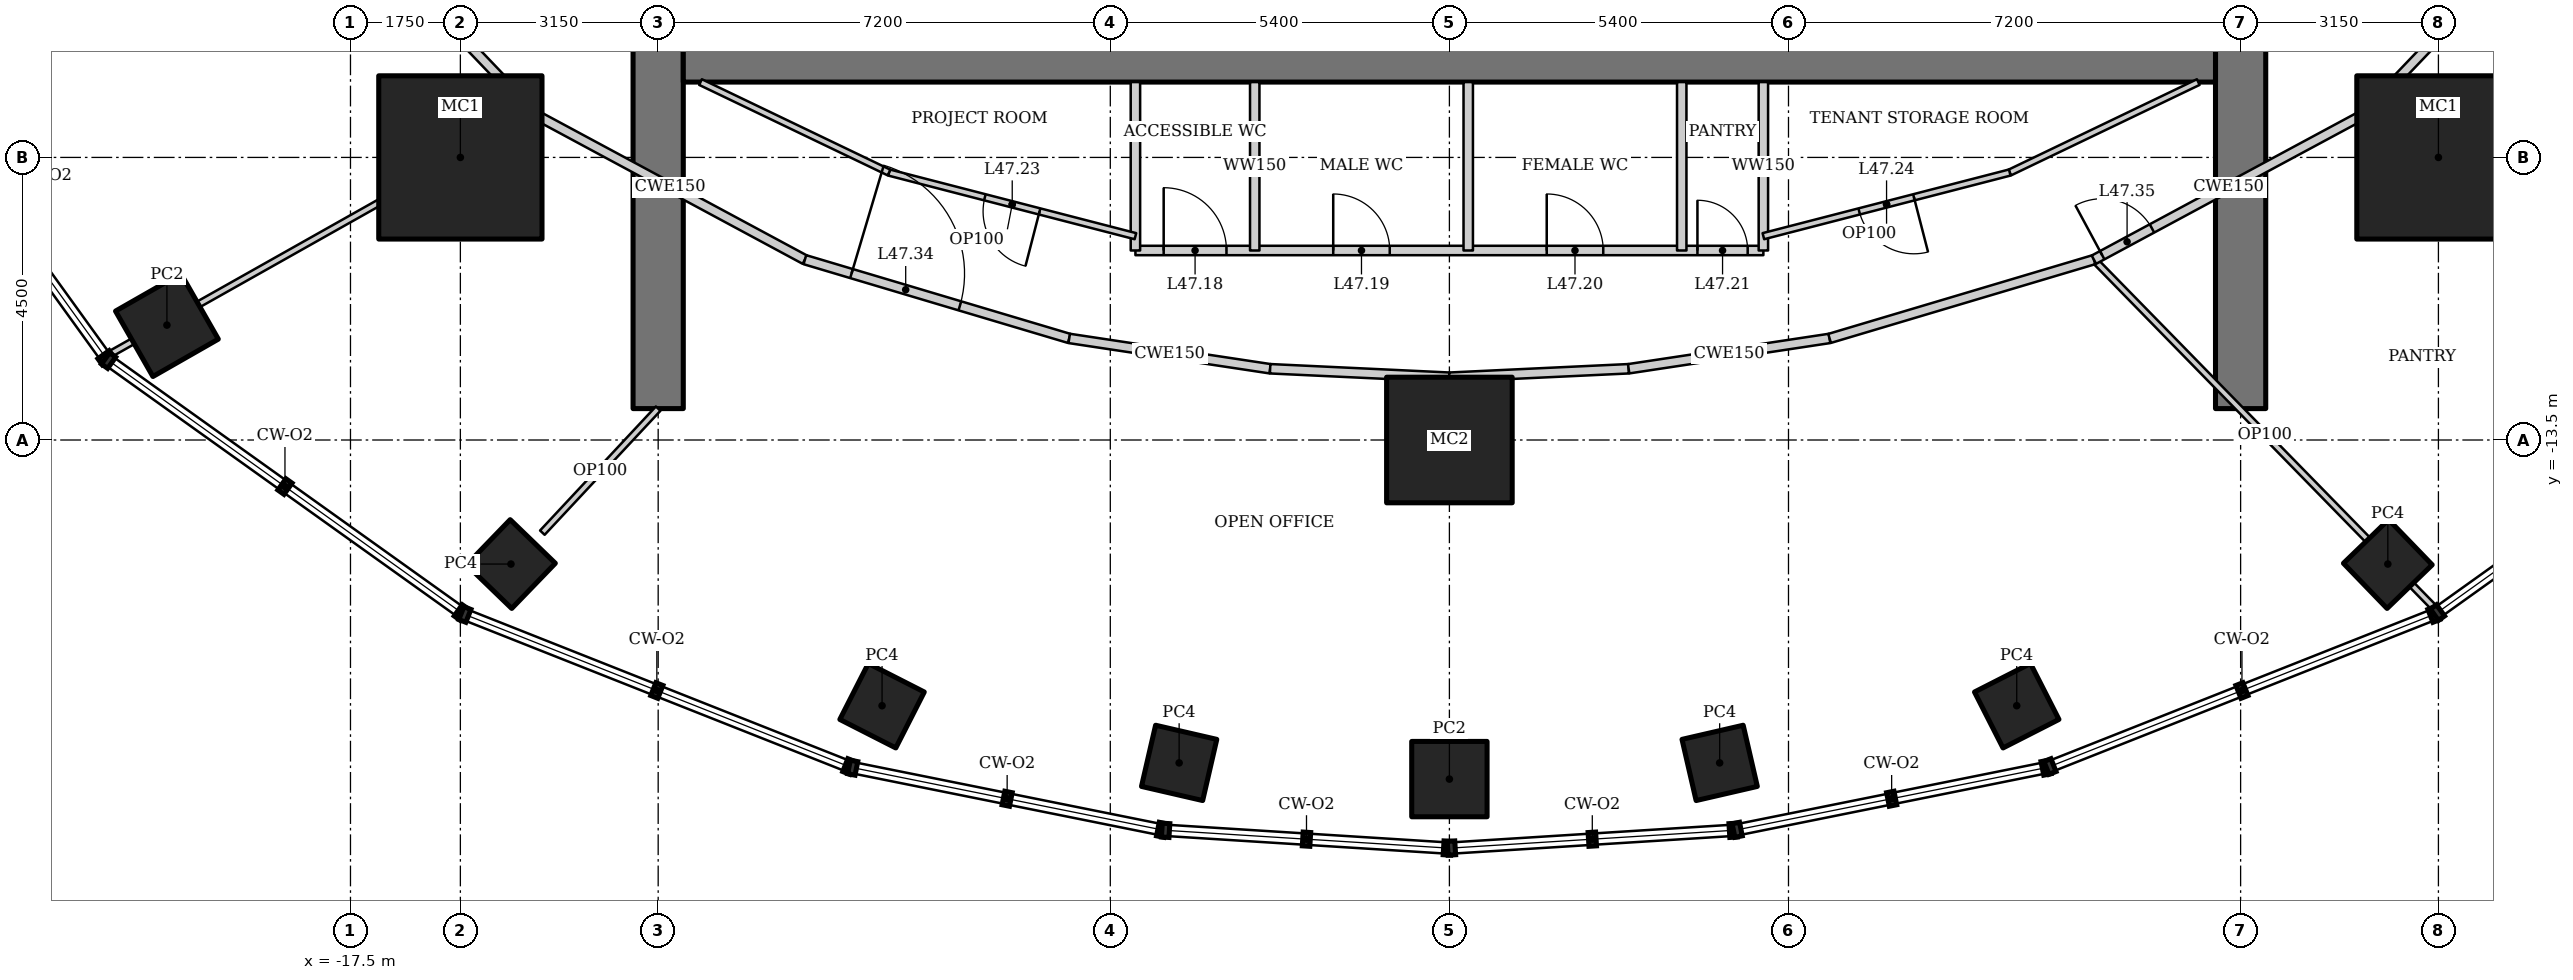
"""IFC4 building model, lengths in metres.
Left out: names, types, materials, properties, quantities, classifications, styles, units other than length and angle.
Written with IfcOpenShell. Run it as: python <this file> out.ifc"""

import sys

from ifc_helpers import new_model, si_unit, direction, frame, frame_2d, origin, origin_2d, place, context, subcontext, project, spatial, rectangle, hollow_rectangle, extrude, element, fill, save


model = new_model("IFC4")
c1 = context("Model", 3, precision=1e-05, world=origin(), true_north=direction((0.0, 1.0)))
c2 = subcontext(c1, "Body", "Model", "MODEL_VIEW")
j1 = project(units=[si_unit("LENGTHUNIT", "METRE"), si_unit("PLANEANGLEUNIT", "RADIAN")], contexts=[c1])
p1 = place(None, origin())
s1 = spatial("IfcSite", under=j1, at=p1, CompositionType="ELEMENT")
p2 = place(p1, origin())
s2 = spatial("IfcBuilding", under=s1, at=p2, CompositionType="ELEMENT")
p3 = place(p2, frame((0.0, 0.0, 203.2)))
s3 = spatial("IfcBuildingStorey", under=s2, at=p3, CompositionType="ELEMENT", Elevation=203.2)
p4 = place(p3, frame((-15.75, -9.0, 0.0), z_axis=(0.0, 0.0, 1.0), x_axis=(1.0, 0.0, 0.0)))
e1 = element("IfcColumn", 1, at=p4, inside=s3, PredefinedType="COLUMN", context=c2, shape_type="SweptSolid", body=[
    extrude(hollow_rectangle(XDim=2.6, YDim=2.6, WallThickness=0.13, at=origin_2d()), origin(), (0.0, 0.0, 1.0), 4.2),
])
p5 = place(p3, frame((0.0, -13.5, 0.0), z_axis=(0.0, 0.0, 1.0), x_axis=(1.0, 0.0, 0.0)))
e2 = element("IfcColumn", 2, at=p5, inside=s3, PredefinedType="COLUMN", context=c2, shape_type="SweptSolid", body=[
    extrude(hollow_rectangle(XDim=2.0, YDim=2.0, WallThickness=0.17, at=origin_2d()), origin(), (0.0, 0.0, 1.0), 4.2),
])
p6 = place(p3, frame((15.75, -9.0, 0.0), z_axis=(0.0, 0.0, 1.0), x_axis=(1.0, 0.0, 0.0)))
e3 = element("IfcColumn", 3, at=p6, inside=s3, PredefinedType="COLUMN", context=c2, shape_type="SweptSolid", body=[
    extrude(hollow_rectangle(XDim=2.6, YDim=2.6, WallThickness=0.13, at=origin_2d()), origin(), (0.0, 0.0, 1.0), 4.2),
])
p7 = place(p3, frame((-20.423, -11.67, 0.0), z_axis=(0.0, 0.0, 1.0), x_axis=(0.86824298017, 0.496139221777, 0.0)))
e4 = element("IfcColumn", 4, at=p7, inside=s3, PredefinedType="COLUMN", context=c2, shape_type="SweptSolid", body=[
    extrude(hollow_rectangle(XDim=1.2, YDim=1.2, WallThickness=0.1, at=origin_2d()), origin(), (0.0, 0.0, 1.0), 4.2),
])
for number, where, z_axis, x_axis in (
    (5, (-14.944, -15.475, 0.0), (0.0, 0.0, 1.0), (0.695, 0.719, 0.0)),
    (6, (-9.035, -17.731, 0.0), (0.0, 0.0, 1.0), (0.454, 0.891, 0.0)),
    (7, (-4.304, -18.642, 0.0), (0.0, 0.0, 1.0), (0.225, 0.974, 0.0)),
):
    element("IfcColumn", number, at=place(p3, frame(where, z_axis=z_axis, x_axis=x_axis)), inside=s3, PredefinedType="COLUMN", context=c2, shape_type="SweptSolid", body=[
        extrude(hollow_rectangle(XDim=1.0, YDim=1.0, WallThickness=0.08, at=origin_2d()), origin(), (0.0, 0.0, 1.0), 4.2),
    ])
p8 = place(p3, frame((0.0, -18.9, 0.0), z_axis=(0.0, 0.0, 1.0), x_axis=(1.0, 0.0, 0.0)))
e8 = element("IfcColumn", 8, at=p8, inside=s3, PredefinedType="COLUMN", context=c2, shape_type="SweptSolid", body=[
    extrude(hollow_rectangle(XDim=1.2, YDim=1.2, WallThickness=0.1, at=origin_2d()), origin(), (0.0, 0.0, 1.0), 4.2),
])
for number, where, z_axis, x_axis in (
    (9, (4.304, -18.642, 0.0), (0.0, 0.0, 1.0), (0.974, 0.225, 0.0)),
    (10, (9.035, -17.731, 0.0), (0.0, 0.0, 1.0), (0.891, 0.454, 0.0)),
    (11, (14.944, -15.475, 0.0), (0.0, 0.0, 1.0), (0.719, 0.695, 0.0)),
):
    element("IfcColumn", number, at=place(p3, frame(where, z_axis=z_axis, x_axis=x_axis)), inside=s3, PredefinedType="COLUMN", context=c2, shape_type="SweptSolid", body=[
        extrude(hollow_rectangle(XDim=1.0, YDim=1.0, WallThickness=0.08, at=origin_2d()), origin(), (0.0, 0.0, 1.0), 4.2),
    ])
p9 = place(p3, frame((12.6, -13.0, 0.0), z_axis=(0.0, 0.0, 1.0), x_axis=(0.0, 1.0, 0.0)))
e12 = element("IfcWall", 12, at=p9, inside=s3, PredefinedType="SHEAR", context=c2, shape_type="SweptSolid", body=[
    extrude(rectangle(XDim=26.0, YDim=0.8, at=frame_2d((13.0, 0.0))), origin(), (0.0, 0.0, 1.0), 4.2),
])
p10 = place(p9, frame((12.1, 0.0, 0.0)))
e13 = element("IfcOpeningElement", 13, at=p10, cuts=e12, PredefinedType="OPENING", context=c2, shape_type="SweptSolid", body=[
    extrude(rectangle(XDim=1.8, YDim=2.1, at=frame_2d((0.9, 1.05))), frame((0.0, 0.41, 0.0), z_axis=(0.0, -1.0, 0.0), x_axis=(1.0, 0.0, 0.0)), (0.0, 0.0, 1.0), 0.82),
])
p11 = place(p3, frame((-12.6, 13.0, 0.0), z_axis=(0.0, 0.0, 1.0), x_axis=(0.0, -1.0, 0.0)))
e14 = element("IfcWall", 14, at=p11, inside=s3, PredefinedType="SHEAR", context=c2, shape_type="SweptSolid", body=[
    extrude(rectangle(XDim=26.0, YDim=0.8, at=frame_2d((13.0, 0.0))), origin(), (0.0, 0.0, 1.0), 4.2),
])
p12 = place(p11, frame((12.1, 0.0, 0.0)))
e15 = element("IfcOpeningElement", 15, at=p12, cuts=e14, PredefinedType="OPENING", context=c2, shape_type="SweptSolid", body=[
    extrude(rectangle(XDim=1.8, YDim=2.1, at=frame_2d((0.9, 1.05))), frame((0.0, 0.41, 0.0), z_axis=(0.0, -1.0, 0.0), x_axis=(1.0, 0.0, 0.0)), (0.0, 0.0, 1.0), 0.82),
])
p13 = place(p3, frame((-12.2, -7.3, 0.0), z_axis=(0.0, 0.0, 1.0), x_axis=(1.0, 0.0, 0.0)))
e16 = element("IfcWall", 16, at=p13, inside=s3, PredefinedType="SHEAR", context=c2, shape_type="SweptSolid", body=[
    extrude(rectangle(XDim=24.4, YDim=1.0, at=frame_2d((12.2, 0.0))), origin(), (0.0, 0.0, 1.0), 4.2),
])
p14 = place(p3, frame((-21.358, -12.15, 0.0), z_axis=(0.0, 0.0, 1.0), x_axis=(0.871273053995, 0.490798599614, 0.0)))
e17 = element("IfcWall", 17, at=p14, inside=s3, PredefinedType="PARTITIONING", context=c2, shape_type="SweptSolid", body=[
    extrude(rectangle(XDim=7.807, YDim=0.1, at=frame_2d((3.904, 0.0))), origin(), (0.0, 0.0, 1.0), 3.524),
])
p15 = place(p3, frame((15.709, -16.199, 0.0), z_axis=(0.0, 0.0, 1.0), x_axis=(-0.699053895446, 0.715068983569, 0.0)))
e18 = element("IfcWall", 18, at=p15, inside=s3, PredefinedType="PARTITIONING", context=c2, shape_type="SweptSolid", body=[
    extrude(rectangle(XDim=7.79, YDim=0.1, at=frame_2d((3.895, 0.0))), origin(), (0.0, 0.0, 1.0), 3.41),
])
p16 = place(p3, frame((21.358, -12.15, 0.0), z_axis=(0.0, 0.0, 1.0), x_axis=(-0.871273053995, 0.490798599614, 0.0)))
e19 = element("IfcWall", 19, at=p16, inside=s3, PredefinedType="PARTITIONING", context=c2, shape_type="SweptSolid", body=[
    extrude(rectangle(XDim=7.807, YDim=0.1, at=frame_2d((3.904, 0.0))), origin(), (0.0, 0.0, 1.0), 3.522),
])
p17 = place(p3, frame((-18.174, -4.531, 0.0), z_axis=(0.0, 0.0, 1.0), x_axis=(0.690768413292, -0.723076067366, 0.0)))
e20 = element("IfcWall", 20, at=p17, inside=s3, PredefinedType="PARTITIONING", context=c2, shape_type="SweptSolid", body=[
    extrude(rectangle(XDim=5.237, YDim=0.15, at=frame_2d((2.618, 0.0))), origin(), (0.0, 0.0, 1.0), 4.05),
])
p18 = place(p17, frame((0.1, 0.0, 0.0)))
e21 = element("IfcOpeningElement", 21, at=p18, cuts=e20, PredefinedType="OPENING", context=c2, shape_type="SweptSolid", body=[
    extrude(rectangle(XDim=1.8, YDim=2.1, at=frame_2d((0.9, 1.05))), frame((0.0, 0.085, 0.0), z_axis=(0.0, -1.0, 0.0), x_axis=(1.0, 0.0, 0.0)), (0.0, 0.0, 1.0), 0.17),
])
p19 = place(p3, frame((-14.556, -8.318, 0.0), z_axis=(0.0, 0.0, 1.0), x_axis=(0.88053863253, -0.47397438393, 0.0)))
e22 = element("IfcWall", 22, at=p19, inside=s3, PredefinedType="PARTITIONING", context=c2, shape_type="SweptSolid", body=[
    extrude(rectangle(XDim=4.875, YDim=0.15, at=frame_2d((2.438, 0.0))), origin(), (0.0, 0.0, 1.0), 4.05),
])
p20 = place(p3, frame((-10.264, -10.628, 0.0), z_axis=(0.0, 0.0, 1.0), x_axis=(0.958384389306, -0.285480931648, 0.0)))
e23 = element("IfcWall", 23, at=p20, inside=s3, PredefinedType="PARTITIONING", context=c2, shape_type="SweptSolid", body=[
    extrude(rectangle(XDim=4.392, YDim=0.15, at=frame_2d((2.196, 0.0))), origin(), (0.0, 0.0, 1.0), 4.05),
])
p21 = place(p20, frame((0.775, 0.0, 0.0)))
e24 = element("IfcOpeningElement", 24, at=p21, cuts=e23, PredefinedType="OPENING", context=c2, shape_type="SweptSolid", body=[
    extrude(rectangle(XDim=1.8, YDim=2.1, at=frame_2d((0.9, 1.05))), frame((0.0, 0.085, 0.0), z_axis=(0.0, -1.0, 0.0), x_axis=(1.0, 0.0, 0.0)), (0.0, 0.0, 1.0), 0.17),
])
p22 = place(p3, frame((-6.054, -11.882, 0.0), z_axis=(0.0, 0.0, 1.0), x_axis=(0.988800347251, -0.149244340852, 0.0)))
e25 = element("IfcWall", 25, at=p22, inside=s3, PredefinedType="PARTITIONING", context=c2, shape_type="SweptSolid", body=[
    extrude(rectangle(XDim=3.236, YDim=0.15, at=frame_2d((1.618, 0.0))), origin(), (0.0, 0.0, 1.0), 4.05),
])
for number, where, z_axis, x_axis in (
    (26, (-2.855, -12.365, 0.0), (0.0, 0.0, 1.0), (0.999, -0.047, 0.0)),
    (27, (0.0, -12.5, 0.0), (0.0, 0.0, 1.0), (0.999, 0.047, 0.0)),
):
    element("IfcWall", number, at=place(p3, frame(where, z_axis=z_axis, x_axis=x_axis)), inside=s3, PredefinedType="PARTITIONING", context=c2, shape_type="SweptSolid", body=[
        extrude(rectangle(XDim=2.858, YDim=0.15, at=frame_2d((1.429, 0.0))), origin(), (0.0, 0.0, 1.0), 4.05),
    ])
p23 = place(p3, frame((2.855, -12.365, 0.0), z_axis=(0.0, 0.0, 1.0), x_axis=(0.988800347251, 0.149244340852, 0.0)))
e28 = element("IfcWall", 28, at=p23, inside=s3, PredefinedType="PARTITIONING", context=c2, shape_type="SweptSolid", body=[
    extrude(rectangle(XDim=3.236, YDim=0.15, at=frame_2d((1.618, 0.0))), origin(), (0.0, 0.0, 1.0), 4.05),
])
p24 = place(p3, frame((6.054, -11.882, 0.0), z_axis=(0.0, 0.0, 1.0), x_axis=(0.958384389306, 0.285480931648, 0.0)))
e29 = element("IfcWall", 29, at=p24, inside=s3, PredefinedType="PARTITIONING", context=c2, shape_type="SweptSolid", body=[
    extrude(rectangle(XDim=4.392, YDim=0.15, at=frame_2d((2.196, 0.0))), origin(), (0.0, 0.0, 1.0), 4.05),
])
p25 = place(p3, frame((10.264, -10.628, 0.0), z_axis=(0.0, 0.0, 1.0), x_axis=(0.88053863253, 0.47397438393, 0.0)))
e30 = element("IfcWall", 30, at=p25, inside=s3, PredefinedType="PARTITIONING", context=c2, shape_type="SweptSolid", body=[
    extrude(rectangle(XDim=4.875, YDim=0.15, at=frame_2d((2.438, 0.0))), origin(), (0.0, 0.0, 1.0), 4.05),
])
p26 = place(p25, frame((0.15, 0.0, 0.0)))
e31 = element("IfcOpeningElement", 31, at=p26, cuts=e30, PredefinedType="OPENING", context=c2, shape_type="SweptSolid", body=[
    extrude(rectangle(XDim=0.9, YDim=2.1, at=frame_2d((0.45, 1.05))), frame((0.0, 0.085, 0.0), z_axis=(0.0, -1.0, 0.0), x_axis=(1.0, 0.0, 0.0)), (0.0, 0.0, 1.0), 0.17),
])
p27 = place(p3, frame((14.556, -8.318, 0.0), z_axis=(0.0, 0.0, 1.0), x_axis=(0.690768413292, 0.723076067366, 0.0)))
e32 = element("IfcWall", 32, at=p27, inside=s3, PredefinedType="PARTITIONING", context=c2, shape_type="SweptSolid", body=[
    extrude(rectangle(XDim=5.237, YDim=0.15, at=frame_2d((2.618, 0.0))), origin(), (0.0, 0.0, 1.0), 4.05),
])
p28 = place(p27, frame((4.187, 0.0, 0.0)))
e33 = element("IfcOpeningElement", 33, at=p28, cuts=e32, PredefinedType="OPENING", context=c2, shape_type="SweptSolid", body=[
    extrude(rectangle(XDim=0.9, YDim=2.1, at=frame_2d((0.45, 1.05))), frame((0.0, 0.085, 0.0), z_axis=(0.0, -1.0, 0.0), x_axis=(1.0, 0.0, 0.0)), (0.0, 0.0, 1.0), 0.17),
])
p29 = place(p3, frame((-5.0, -10.482, 0.0), z_axis=(0.0, 0.0, 1.0), x_axis=(1.0, 0.0, 0.0)))
e34 = element("IfcWall", 34, at=p29, inside=s3, PredefinedType="SOLIDWALL", context=c2, shape_type="SweptSolid", body=[
    extrude(rectangle(XDim=10.0, YDim=0.15, at=frame_2d((5.0, 0.0))), origin(), (0.0, 0.0, 1.0), 4.05),
])
p30 = place(p29, frame((0.45, 0.0, 0.0)))
e35 = element("IfcOpeningElement", 35, at=p30, cuts=e34, PredefinedType="OPENING", context=c2, shape_type="SweptSolid", body=[
    extrude(rectangle(XDim=1.0, YDim=2.1, at=frame_2d((0.5, 1.05))), frame((0.0, 0.085, 0.0), z_axis=(0.0, -1.0, 0.0), x_axis=(1.0, 0.0, 0.0)), (0.0, 0.0, 1.0), 0.17),
])
p31 = place(p29, frame((3.15, 0.0, 0.0)))
e36 = element("IfcOpeningElement", 36, at=p31, cuts=e34, PredefinedType="OPENING", context=c2, shape_type="SweptSolid", body=[
    extrude(rectangle(XDim=0.9, YDim=2.1, at=frame_2d((0.45, 1.05))), frame((0.0, 0.085, 0.0), z_axis=(0.0, -1.0, 0.0), x_axis=(1.0, 0.0, 0.0)), (0.0, 0.0, 1.0), 0.17),
])
p32 = place(p29, frame((6.55, 0.0, 0.0)))
e37 = element("IfcOpeningElement", 37, at=p32, cuts=e34, PredefinedType="OPENING", context=c2, shape_type="SweptSolid", body=[
    extrude(rectangle(XDim=0.9, YDim=2.1, at=frame_2d((0.45, 1.05))), frame((0.0, 0.085, 0.0), z_axis=(0.0, -1.0, 0.0), x_axis=(1.0, 0.0, 0.0)), (0.0, 0.0, 1.0), 0.17),
])
p33 = place(p29, frame((8.95, 0.0, 0.0)))
e38 = element("IfcOpeningElement", 38, at=p33, cuts=e34, PredefinedType="OPENING", context=c2, shape_type="SweptSolid", body=[
    extrude(rectangle(XDim=0.8, YDim=2.1, at=frame_2d((0.4, 1.05))), frame((0.0, 0.085, 0.0), z_axis=(0.0, -1.0, 0.0), x_axis=(1.0, 0.0, 0.0)), (0.0, 0.0, 1.0), 0.17),
])
for number, where, z_axis, x_axis in (
    (39, (-5.0, -7.8, 0.0), (0.0, 0.0, 1.0), (0.0, -1.0, 0.0)),
    (40, (5.0, -7.8, 0.0), (0.0, 0.0, 1.0), (0.0, -1.0, 0.0)),
    (41, (-3.1, -7.8, 0.0), (0.0, 0.0, 1.0), (0.0, -1.0, 0.0)),
    (42, (0.3, -7.8, 0.0), (0.0, 0.0, 1.0), (0.0, -1.0, 0.0)),
    (43, (3.7, -7.8, 0.0), (0.0, 0.0, 1.0), (0.0, -1.0, 0.0)),
):
    element("IfcWall", number, at=place(p3, frame(where, z_axis=z_axis, x_axis=x_axis)), inside=s3, PredefinedType="SOLIDWALL", context=c2, shape_type="SweptSolid", body=[
        extrude(rectangle(XDim=2.682, YDim=0.15, at=frame_2d((1.341, 0.0))), origin(), (0.0, 0.0, 1.0), 4.05),
    ])
p34 = place(p3, frame((-5.0, -10.254, 0.0), z_axis=(0.0, 0.0, 1.0), x_axis=(-0.968224167198, 0.250083910027, 0.0)))
e44 = element("IfcWall", 44, at=p34, inside=s3, PredefinedType="PARTITIONING", context=c2, shape_type="SweptSolid", body=[
    extrude(rectangle(XDim=4.052, YDim=0.1, at=frame_2d((2.026, 0.0))), origin(), (0.0, 0.0, 1.0), 4.05),
])
p35 = place(p34, frame((1.576, 0.0, 0.0)))
e45 = element("IfcOpeningElement", 45, at=p35, cuts=e44, PredefinedType="OPENING", context=c2, shape_type="SweptSolid", body=[
    extrude(rectangle(XDim=0.9, YDim=2.1, at=frame_2d((0.45, 1.05))), frame((0.0, 0.06, 0.0), z_axis=(0.0, -1.0, 0.0), x_axis=(1.0, 0.0, 0.0)), (0.0, 0.0, 1.0), 0.12),
])
for number, where, z_axis, x_axis in (
    (46, (-8.924, -9.241, 0.0), (0.0, 0.0, 1.0), (-0.902, 0.433, 0.0)),
    (47, (11.926, -7.8, 0.0), (0.0, 0.0, 1.0), (-0.902, -0.433, 0.0)),
):
    element("IfcWall", number, at=place(p3, frame(where, z_axis=z_axis, x_axis=x_axis)), inside=s3, PredefinedType="PARTITIONING", context=c2, shape_type="SweptSolid", body=[
        extrude(rectangle(XDim=3.33, YDim=0.1, at=frame_2d((1.665, 0.0))), origin(), (0.0, 0.0, 1.0), 4.05),
    ])
p36 = place(p3, frame((8.924, -9.241, 0.0), z_axis=(0.0, 0.0, 1.0), x_axis=(-0.968224167198, -0.250083910027, 0.0)))
e48 = element("IfcWall", 48, at=p36, inside=s3, PredefinedType="PARTITIONING", context=c2, shape_type="SweptSolid", body=[
    extrude(rectangle(XDim=4.052, YDim=0.1, at=frame_2d((2.026, 0.0))), origin(), (0.0, 0.0, 1.0), 4.05),
])
p37 = place(p36, frame((1.576, 0.0, 0.0)))
e49 = element("IfcOpeningElement", 49, at=p37, cuts=e48, PredefinedType="OPENING", context=c2, shape_type="SweptSolid", body=[
    extrude(rectangle(XDim=0.9, YDim=2.1, at=frame_2d((0.45, 1.05))), frame((0.0, 0.06, 0.0), z_axis=(0.0, -1.0, 0.0), x_axis=(1.0, 0.0, 0.0)), (0.0, 0.0, 1.0), 0.12),
])
p38 = place(p3, frame((-12.6, -13.0, 0.0), z_axis=(0.0, 0.0, 1.0), x_axis=(-0.682434118301, -0.730947107648, 0.0)))
e50 = element("IfcWall", 50, at=p38, inside=s3, PredefinedType="PARTITIONING", context=c2, shape_type="SweptSolid", body=[
    extrude(rectangle(XDim=2.702, YDim=0.1, at=frame_2d((1.351, 0.0))), origin(), (0.0, 0.0, 1.0), 3.41),
])
p39 = place(p30, origin())
e51 = element("IfcDoor", 51, at=p39, inside=s3, OperationType="SINGLE_SWING_LEFT", PredefinedType="DOOR", context=c2, shape_type="SweptSolid", body=[
    extrude(rectangle(XDim=1.0, YDim=2.1, at=frame_2d((0.5, 1.05))), frame((0.0, 0.025, 0.0), z_axis=(0.0, -1.0, 0.0), x_axis=(1.0, 0.0, 0.0)), (0.0, 0.0, 1.0), 0.05),
])
fill(e35, e51)
p40 = place(p31, origin())
e52 = element("IfcDoor", 52, at=p40, inside=s3, OperationType="SINGLE_SWING_LEFT", PredefinedType="DOOR", context=c2, shape_type="SweptSolid", body=[
    extrude(rectangle(XDim=0.9, YDim=2.1, at=frame_2d((0.45, 1.05))), frame((0.0, 0.025, 0.0), z_axis=(0.0, -1.0, 0.0), x_axis=(1.0, 0.0, 0.0)), (0.0, 0.0, 1.0), 0.05),
])
fill(e36, e52)
p41 = place(p32, origin())
e53 = element("IfcDoor", 53, at=p41, inside=s3, OperationType="SINGLE_SWING_LEFT", PredefinedType="DOOR", context=c2, shape_type="SweptSolid", body=[
    extrude(rectangle(XDim=0.9, YDim=2.1, at=frame_2d((0.45, 1.05))), frame((0.0, 0.025, 0.0), z_axis=(0.0, -1.0, 0.0), x_axis=(1.0, 0.0, 0.0)), (0.0, 0.0, 1.0), 0.05),
])
fill(e37, e53)
p42 = place(p33, origin())
e54 = element("IfcDoor", 54, at=p42, inside=s3, OperationType="SINGLE_SWING_LEFT", PredefinedType="DOOR", context=c2, shape_type="SweptSolid", body=[
    extrude(rectangle(XDim=0.8, YDim=2.1, at=frame_2d((0.4, 1.05))), frame((0.0, 0.025, 0.0), z_axis=(0.0, -1.0, 0.0), x_axis=(1.0, 0.0, 0.0)), (0.0, 0.0, 1.0), 0.05),
])
fill(e38, e54)
p43 = place(p35, origin())
e55 = element("IfcDoor", 55, at=p43, inside=s3, OperationType="SINGLE_SWING_LEFT", PredefinedType="DOOR", context=c2, shape_type="SweptSolid", body=[
    extrude(rectangle(XDim=0.9, YDim=2.1, at=frame_2d((0.45, 1.05))), frame((0.0, 0.025, 0.0), z_axis=(0.0, -1.0, 0.0), x_axis=(1.0, 0.0, 0.0)), (0.0, 0.0, 1.0), 0.05),
])
fill(e45, e55)
p44 = place(p37, origin())
e56 = element("IfcDoor", 56, at=p44, inside=s3, OperationType="SINGLE_SWING_LEFT", PredefinedType="DOOR", context=c2, shape_type="SweptSolid", body=[
    extrude(rectangle(XDim=0.9, YDim=2.1, at=frame_2d((0.45, 1.05))), frame((0.0, 0.025, 0.0), z_axis=(0.0, -1.0, 0.0), x_axis=(1.0, 0.0, 0.0)), (0.0, 0.0, 1.0), 0.05),
])
fill(e49, e56)
p45 = place(p21, origin())
e57 = element("IfcDoor", 57, at=p45, inside=s3, OperationType="DOUBLE_DOOR_DOUBLE_SWING", PredefinedType="DOOR", context=c2, shape_type="SweptSolid", body=[
    extrude(rectangle(XDim=1.8, YDim=2.1, at=frame_2d((0.9, 1.05))), frame((0.0, 0.025, 0.0), z_axis=(0.0, -1.0, 0.0), x_axis=(1.0, 0.0, 0.0)), (0.0, 0.0, 1.0), 0.05),
])
fill(e24, e57)
p46 = place(p26, origin())
e58 = element("IfcDoor", 58, at=p46, inside=s3, OperationType="SINGLE_SWING_LEFT", PredefinedType="DOOR", context=c2, shape_type="SweptSolid", body=[
    extrude(rectangle(XDim=0.9, YDim=2.1, at=frame_2d((0.45, 1.05))), frame((0.0, 0.025, 0.0), z_axis=(0.0, -1.0, 0.0), x_axis=(1.0, 0.0, 0.0)), (0.0, 0.0, 1.0), 0.05),
])
fill(e31, e58)
save(model, sys.argv[1])
